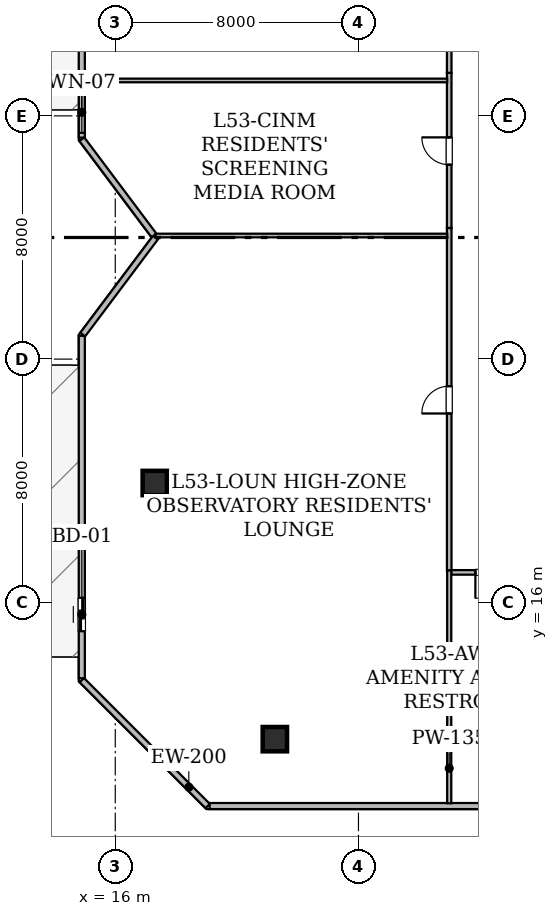
"""IFC4 building model, lengths in metres.
Left out: names, types, materials, properties, quantities, classifications, styles, units other than length and angle.
Written with IfcOpenShell. Run it as: python <this file> out.ifc"""

import sys

from ifc_helpers import new_model, si_unit, direction, frame, frame_2d, origin, origin_2d, place, context, subcontext, project, spatial, rectangle, hollow_rectangle, extrude, element, fill, save


model = new_model("IFC4")
c1 = context("Model", 3, precision=1e-05, world=origin(), true_north=direction((0.0, 1.0)))
c2 = subcontext(c1, "Body", "Model", "MODEL_VIEW")
j1 = project(units=[si_unit("LENGTHUNIT", "METRE"), si_unit("PLANEANGLEUNIT", "RADIAN")], contexts=[c1])
p1 = place(None, origin())
s1 = spatial("IfcSite", under=j1, at=p1, CompositionType="ELEMENT")
p2 = place(p1, origin())
s2 = spatial("IfcBuilding", under=s1, at=p2, CompositionType="ELEMENT")
p3 = place(p2, frame((0.0, 0.0, 207.0)))
s3 = spatial("IfcBuildingStorey", under=s2, at=p3, CompositionType="ELEMENT", Elevation=207.0)
for number, where, z_axis, x_axis in (
    (1, (21.25, 11.5, 0.0), (0.0, 0.0, 1.0), (1.0, 0.0, 0.0)),
    (2, (17.3, 19.925, 0.0), (0.0, 0.0, 1.0), (1.0, 0.0, 0.0)),
):
    element("IfcColumn", number, at=place(p3, frame(where, z_axis=z_axis, x_axis=x_axis)), inside=s3, PredefinedType="COLUMN", context=c2, shape_type="SweptSolid", body=[
        extrude(hollow_rectangle(XDim=0.8, YDim=0.8, WallThickness=0.04, at=origin_2d()), origin(), (0.0, 0.0, 1.0), 4.8),
    ])
p4 = place(p3, frame((19.041, 9.3, 0.0), z_axis=(0.0, 0.0, 1.0), x_axis=(-0.707127625344, 0.707085936414, 0.0)))
e3 = element("IfcWall", 3, at=p4, inside=s3, PredefinedType="STANDARD", context=c2, shape_type="SweptSolid", body=[
    extrude(rectangle(XDim=5.856, YDim=0.2, at=frame_2d((2.928, 0.0))), origin(), (0.0, 0.0, 1.0), 4.48),
])
p5 = place(p3, frame((14.9, 13.504, 0.0), z_axis=(0.0, 0.0, 1.0), x_axis=(0.0, 1.0, 0.0)))
e4 = element("IfcWall", 4, at=p5, inside=s3, PredefinedType="STANDARD", context=c2, shape_type="SweptSolid", body=[
    extrude(rectangle(XDim=11.263, YDim=0.2, at=frame_2d((5.632, 0.0))), origin(), (0.0, 0.0, 1.0), 4.48),
])
p6 = place(p5, frame((1.546, 0.0, 0.0)))
e5 = element("IfcOpeningElement", 5, at=p6, cuts=e4, PredefinedType="OPENING", context=c2, shape_type="SweptSolid", body=[
    extrude(rectangle(XDim=1.1, YDim=2.2, at=frame_2d((0.55, 1.1))), frame((0.0, 0.11, 0.0), z_axis=(0.0, -1.0, 0.0), x_axis=(1.0, 0.0, 0.0)), (0.0, 0.0, 1.0), 0.22),
])
p7 = place(p3, frame((14.93, 24.807, 0.0), z_axis=(0.0, 0.0, 1.0), x_axis=(0.600029358831, 0.799977980035, 0.0)))
e6 = element("IfcWall", 6, at=p7, inside=s3, PredefinedType="STANDARD", context=c2, shape_type="SweptSolid", body=[
    extrude(rectangle(XDim=3.991, YDim=0.2, at=frame_2d((1.996, 0.0))), origin(), (0.0, 0.0, 1.0), 4.48),
])
p8 = place(p3, frame((17.273, 28.069, 0.0), z_axis=(0.0, 0.0, 1.0), x_axis=(-0.600029630681, 0.799977776132, 0.0)))
e7 = element("IfcWall", 7, at=p8, inside=s3, PredefinedType="STANDARD", context=c2, shape_type="SweptSolid", body=[
    extrude(rectangle(XDim=3.955, YDim=0.2, at=frame_2d((1.978, 0.0))), origin(), (0.0, 0.0, 1.0), 4.48),
])
p9 = place(p3, frame((14.9, 31.284, 0.0), z_axis=(0.0, 0.0, 1.0), x_axis=(0.0, 1.0, 0.0)))
e8 = element("IfcWall", 8, at=p9, inside=s3, PredefinedType="STANDARD", context=c2, shape_type="SweptSolid", body=[
    extrude(rectangle(XDim=11.275, YDim=0.2, at=frame_2d((5.638, 0.0))), origin(), (0.0, 0.0, 1.0), 4.48),
])
p10 = place(p9, frame((8.175, 0.0, 0.0)))
e9 = element("IfcOpeningElement", 9, at=p10, cuts=e8, PredefinedType="OPENING", context=c2, shape_type="SweptSolid", body=[
    extrude(rectangle(XDim=1.1, YDim=2.2, at=frame_2d((0.55, 1.1))), frame((0.0, 0.11, 0.0), z_axis=(0.0, -1.0, 0.0), x_axis=(1.0, 0.0, 0.0)), (0.0, 0.0, 1.0), 0.22),
])
p11 = place(p9, frame((0.158, 0.0, 0.85)))
e10 = element("IfcOpeningElement", 10, at=p11, cuts=e8, PredefinedType="OPENING", context=c2, shape_type="SweptSolid", body=[
    extrude(rectangle(XDim=1.35, YDim=1.5, at=frame_2d((0.675, 0.75))), frame((0.0, 0.11, 0.0), z_axis=(0.0, -1.0, 0.0), x_axis=(1.0, 0.0, 0.0)), (0.0, 0.0, 1.0), 0.22),
])
p12 = place(p3, frame((58.896, 9.3, 0.0), z_axis=(0.0, 0.0, 1.0), x_axis=(-1.0, 0.0, 0.0)))
e11 = element("IfcWall", 11, at=p12, inside=s3, PredefinedType="STANDARD", context=c2, shape_type="SweptSolid", body=[
    extrude(rectangle(XDim=39.793, YDim=0.2, at=frame_2d((19.896, 0.0))), origin(), (0.0, 0.0, 1.0), 4.48),
])
p13 = place(p12, frame((18.921, 0.0, 0.9)))
e12 = element("IfcOpeningElement", 12, at=p13, cuts=e11, PredefinedType="OPENING", context=c2, shape_type="SweptSolid", body=[
    extrude(rectangle(XDim=1.95, YDim=1.65, at=frame_2d((0.975, 0.825))), frame((0.0, 0.11, 0.0), z_axis=(0.0, -1.0, 0.0), x_axis=(1.0, 0.0, 0.0)), (0.0, 0.0, 1.0), 0.22),
])
p14 = place(p3, frame((26.985, 17.05, 0.0), z_axis=(0.0, 0.0, 1.0), x_axis=(0.0, 1.0, 0.0)))
e13 = element("IfcWall", 13, at=p14, inside=s3, PredefinedType="STANDARD", context=c2, shape_type="SweptSolid", body=[
    extrude(rectangle(XDim=11.264, YDim=0.15, at=frame_2d((5.632, 0.0))), origin(), (0.0, 0.0, 1.0), 3.775),
])
p15 = place(p14, frame((5.161, 0.0, 0.0)))
e14 = element("IfcOpeningElement", 14, at=p15, cuts=e13, PredefinedType="OPENING", context=c2, shape_type="SweptSolid", body=[
    extrude(rectangle(XDim=0.9, YDim=2.1, at=frame_2d((0.45, 1.05))), frame((0.0, 0.085, 0.0), z_axis=(0.0, -1.0, 0.0), x_axis=(1.0, 0.0, 0.0)), (0.0, 0.0, 1.0), 0.17),
])
p16 = place(p3, frame((26.985, 28.314, 0.0), z_axis=(0.0, 0.0, 1.0), x_axis=(0.0, 1.0, 0.0)))
e15 = element("IfcWall", 15, at=p16, inside=s3, PredefinedType="STANDARD", context=c2, shape_type="SweptSolid", body=[
    extrude(rectangle(XDim=5.1, YDim=0.15, at=frame_2d((2.55, 0.0))), origin(), (0.0, 0.0, 1.0), 4.007),
])
p17 = place(p16, frame((2.079, 0.0, 0.0)))
e16 = element("IfcOpeningElement", 16, at=p17, cuts=e15, PredefinedType="OPENING", context=c2, shape_type="SweptSolid", body=[
    extrude(rectangle(XDim=0.9, YDim=2.1, at=frame_2d((0.45, 1.05))), frame((0.0, 0.085, 0.0), z_axis=(0.0, -1.0, 0.0), x_axis=(1.0, 0.0, 0.0)), (0.0, 0.0, 1.0), 0.17),
])
p18 = place(p3, frame((26.985, 33.414, 0.0), z_axis=(0.0, 0.0, 1.0), x_axis=(0.0, 1.0, 0.0)))
e17 = element("IfcWall", 17, at=p18, inside=s3, PredefinedType="STANDARD", context=c2, shape_type="SweptSolid", body=[
    extrude(rectangle(XDim=5.536, YDim=0.15, at=frame_2d((2.768, 0.0))), origin(), (0.0, 0.0, 1.0), 3.775),
])
p19 = place(p18, frame((2.193, 0.0, 0.0)))
e18 = element("IfcOpeningElement", 18, at=p19, cuts=e17, PredefinedType="OPENING", context=c2, shape_type="SweptSolid", body=[
    extrude(rectangle(XDim=1.15, YDim=2.2, at=frame_2d((0.575, 1.1))), frame((0.0, 0.085, 0.0), z_axis=(0.0, -1.0, 0.0), x_axis=(1.0, 0.0, 0.0)), (0.0, 0.0, 1.0), 0.17),
])
p20 = place(p3, frame((29.534, 16.985, 0.0), z_axis=(0.0, 0.0, 1.0), x_axis=(-1.0, 0.0, 0.0)))
e19 = element("IfcWall", 19, at=p20, inside=s3, PredefinedType="STANDARD", context=c2, shape_type="SweptSolid", body=[
    extrude(rectangle(XDim=2.484, YDim=0.15, at=frame_2d((1.242, 0.0))), origin(), (0.0, 0.0, 1.0), 3.775),
])
p21 = place(p20, frame((0.838, 0.0, 0.0)))
e20 = element("IfcOpeningElement", 20, at=p21, cuts=e19, PredefinedType="OPENING", context=c2, shape_type="SweptSolid", body=[
    extrude(rectangle(XDim=0.85, YDim=2.1, at=frame_2d((0.425, 1.05))), frame((0.0, 0.085, 0.0), z_axis=(0.0, -1.0, 0.0), x_axis=(1.0, 0.0, 0.0)), (0.0, 0.0, 1.0), 0.17),
])
p22 = place(p3, frame((17.328, 28.065, 0.0), z_axis=(0.0, 0.0, 1.0), x_axis=(1.0, 0.0, 0.0)))
e21 = element("IfcWall", 21, at=p22, inside=s3, PredefinedType="PARTITIONING", context=c2, shape_type="SweptSolid", body=[
    extrude(rectangle(XDim=9.59, YDim=0.12, at=frame_2d((4.795, 0.0))), origin(), (0.0, 0.0, 1.0), 3.937),
])
p23 = place(p3, frame((26.985, 17.05, 0.0), z_axis=(0.0, 0.0, 1.0), x_axis=(0.0, -1.0, 0.0)))
e22 = element("IfcWall", 22, at=p23, inside=s3, PredefinedType="PARTITIONING", context=c2, shape_type="SweptSolid", body=[
    extrude(rectangle(XDim=7.658, YDim=0.135, at=frame_2d((3.829, 0.0))), origin(), (0.0, 0.0, 1.0), 3.775),
])
p24 = place(p3, frame((14.992, 33.165, 0.0), z_axis=(0.0, 0.0, 1.0), x_axis=(1.0, 0.0, 0.0)))
e23 = element("IfcWall", 23, at=p24, inside=s3, PredefinedType="PARTITIONING", context=c2, shape_type="SweptSolid", body=[
    extrude(rectangle(XDim=11.926, YDim=0.12, at=frame_2d((5.963, 0.0))), origin(), (0.0, 0.0, 1.0), 3.937),
])
p25 = place(p6, origin())
e24 = element("IfcDoor", 24, at=p25, inside=s3, OperationType="SLIDING_TO_LEFT", PredefinedType="DOOR", context=c2, shape_type="SweptSolid", body=[
    extrude(rectangle(XDim=1.1, YDim=2.2, at=frame_2d((0.55, 1.1))), frame((0.0, 0.025, 0.0), z_axis=(0.0, -1.0, 0.0), x_axis=(1.0, 0.0, 0.0)), (0.0, 0.0, 1.0), 0.05),
])
fill(e5, e24)
p26 = place(p11, origin())
e25 = element("IfcWindow", 25, at=p26, inside=s3, PartitioningType="SINGLE_PANEL", PredefinedType="WINDOW", context=c2, shape_type="SweptSolid", body=[
    extrude(rectangle(XDim=1.35, YDim=1.5, at=frame_2d((0.675, 0.75))), frame((0.0, 0.03, 0.0), z_axis=(0.0, -1.0, 0.0), x_axis=(1.0, 0.0, 0.0)), (0.0, 0.0, 1.0), 0.06),
])
fill(e10, e25)
p27 = place(p15, origin())
e26 = element("IfcDoor", 26, at=p27, inside=s3, OperationType="SINGLE_SWING_LEFT", PredefinedType="DOOR", context=c2, shape_type="SweptSolid", body=[
    extrude(rectangle(XDim=0.9, YDim=2.1, at=frame_2d((0.45, 1.05))), frame((0.0, 0.025, 0.0), z_axis=(0.0, -1.0, 0.0), x_axis=(1.0, 0.0, 0.0)), (0.0, 0.0, 1.0), 0.05),
])
fill(e14, e26)
p28 = place(p17, origin())
e27 = element("IfcDoor", 27, at=p28, inside=s3, OperationType="SINGLE_SWING_RIGHT", PredefinedType="DOOR", context=c2, shape_type="SweptSolid", body=[
    extrude(rectangle(XDim=0.9, YDim=2.1, at=frame_2d((0.45, 1.05))), frame((0.0, 0.025, 0.0), z_axis=(0.0, -1.0, 0.0), x_axis=(1.0, 0.0, 0.0)), (0.0, 0.0, 1.0), 0.05),
])
fill(e16, e27)
p29 = place(p21, origin())
e28 = element("IfcDoor", 28, at=p29, inside=s3, OperationType="SINGLE_SWING_RIGHT", PredefinedType="DOOR", context=c2, shape_type="SweptSolid", body=[
    extrude(rectangle(XDim=0.85, YDim=2.1, at=frame_2d((0.425, 1.05))), frame((0.0, 0.025, 0.0), z_axis=(0.0, -1.0, 0.0), x_axis=(1.0, 0.0, 0.0)), (0.0, 0.0, 1.0), 0.05),
])
fill(e20, e28)
save(model, sys.argv[1])
